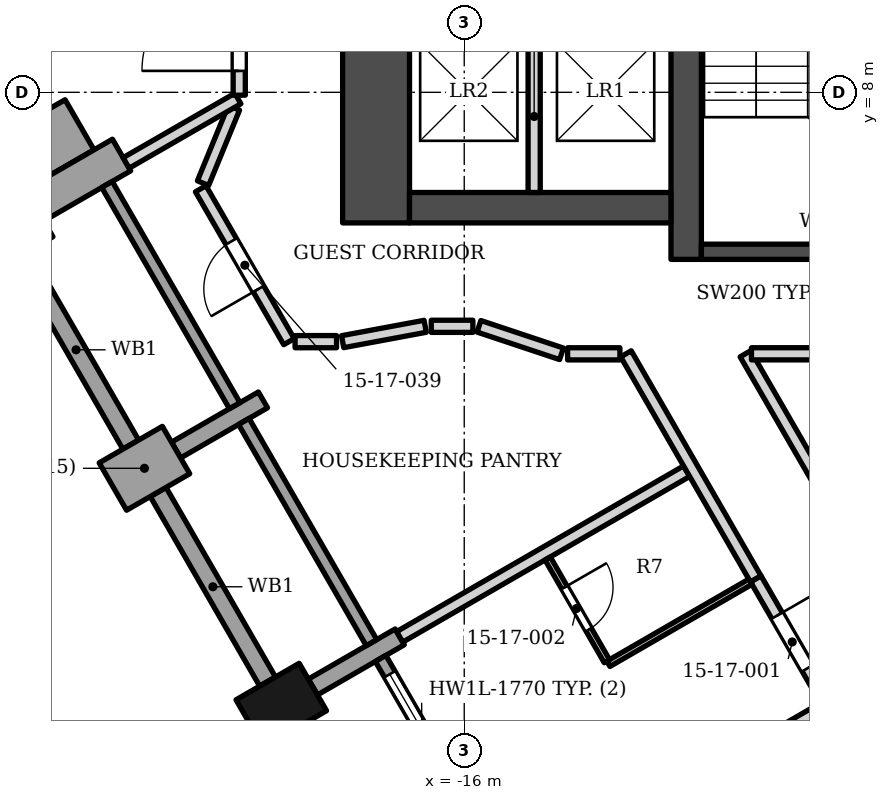
"""IFC4 building model, lengths in metres.
Left out: names, types, materials, properties, quantities, classifications, styles, units other than length and angle.
Written with IfcOpenShell. Run it as: python <this file> out.ifc"""

import sys

from ifc_helpers import new_model, si_unit, direction, frame, frame_2d, origin, origin_2d, place, context, subcontext, project, spatial, rectangle, extrude, element, fill, save


model = new_model("IFC4")
c1 = context("Model", 3, precision=1e-05, world=origin(), true_north=direction((0.0, 1.0)))
c2 = subcontext(c1, "Body", "Model", "MODEL_VIEW")
j1 = project(units=[si_unit("LENGTHUNIT", "METRE"), si_unit("PLANEANGLEUNIT", "RADIAN")], contexts=[c1])
p1 = place(None, origin())
s1 = spatial("IfcSite", under=j1, at=p1, CompositionType="ELEMENT")
p2 = place(p1, origin())
s2 = spatial("IfcBuilding", under=s1, at=p2, CompositionType="ELEMENT")
p3 = place(p2, frame((0.0, 0.0, 76.6)))
s3 = spatial("IfcBuildingStorey", under=s2, at=p3, CompositionType="ELEMENT", Elevation=76.6)
p4 = place(p3, frame((-12.35, 5.253, 0.0), z_axis=(0.0, 0.0, 1.0), x_axis=(0.0, 1.0, 0.0)))
e1 = element("IfcWall", 1, at=p4, inside=s3, PredefinedType="SHEAR", context=c2, shape_type="SweptSolid", body=[
    extrude(rectangle(XDim=13.3, YDim=0.5, at=frame_2d((6.65, 0.0))), origin(), (0.0, 0.0, 1.0), 3.4),
])
p5 = place(p3, frame((-12.1, 5.378, 0.0), z_axis=(0.0, 0.0, 1.0), x_axis=(1.0, 0.0, 0.0)))
e2 = element("IfcWall", 2, at=p5, inside=s3, PredefinedType="SHEAR", context=c2, shape_type="SweptSolid", body=[
    extrude(rectangle(XDim=3.75, YDim=0.25, at=frame_2d((1.875, 0.0))), origin(), (0.0, 0.0, 1.0), 3.4),
])
p6 = place(p3, frame((-12.6, 6.103, 0.0), z_axis=(0.0, 0.0, 1.0), x_axis=(-1.0, 0.0, 0.0)))
e3 = element("IfcWall", 3, at=p6, inside=s3, PredefinedType="SHEAR", context=c2, shape_type="SweptSolid", body=[
    extrude(rectangle(XDim=4.3, YDim=0.5, at=frame_2d((2.15, 0.0))), origin(), (0.0, 0.0, 1.0), 3.4),
])
p7 = place(p3, frame((-17.45, 5.853, 0.0), z_axis=(0.0, 0.0, 1.0), x_axis=(0.0, 1.0, 0.0)))
e4 = element("IfcWall", 4, at=p7, inside=s3, PredefinedType="SHEAR", context=c2, shape_type="SweptSolid", body=[
    extrude(rectangle(XDim=13.2, YDim=1.1, at=frame_2d((6.6, 0.0))), origin(), (0.0, 0.0, 1.0), 3.4),
])
p8 = place(p7, frame((4.1, 0.0, 0.0)))
e5 = element("IfcOpeningElement", 5, at=p8, cuts=e4, PredefinedType="OPENING", context=c2, shape_type="SweptSolid", body=[
    extrude(rectangle(XDim=1.6, YDim=2.1, at=frame_2d((0.8, 1.05))), frame((0.0, 0.56, 0.0), z_axis=(0.0, -1.0, 0.0), x_axis=(1.0, 0.0, 0.0)), (0.0, 0.0, 1.0), 1.12),
])
p9 = place(p7, frame((9.75, 0.0, 0.0)))
e6 = element("IfcOpeningElement", 6, at=p9, cuts=e4, PredefinedType="OPENING", context=c2, shape_type="SweptSolid", body=[
    extrude(rectangle(XDim=0.9, YDim=2.1, at=frame_2d((0.45, 1.05))), frame((0.0, 0.56, 0.0), z_axis=(0.0, -1.0, 0.0), x_axis=(1.0, 0.0, 0.0)), (0.0, 0.0, 1.0), 1.12),
])
for number, where, z_axis, x_axis in (
    (7, (-23.509, 5.714, 0.0), (0.0, 0.0, 1.0), (0.5, -0.866, 0.0)),
    (8, (-19.009, -2.08, 0.0), (0.0, 0.0, 1.0), (0.5, -0.866, 0.0)),
):
    element("IfcColumn", number, at=place(p3, frame(where, z_axis=z_axis, x_axis=x_axis)), inside=s3, PredefinedType="COLUMN", context=c2, shape_type="SweptSolid", body=[
        extrude(rectangle(XDim=0.9, YDim=1.2, at=origin_2d()), origin(), (0.0, 0.0, 1.0), 3.4),
    ])
p10 = place(p3, frame((-21.635, 6.969, 0.0), z_axis=(0.0, 0.0, 1.0), x_axis=(-0.866040211805, -0.499974350878, 0.0)))
e9 = element("IfcWall", 9, at=p10, inside=s3, PredefinedType="SOLIDWALL", context=c2, shape_type="SweptSolid", body=[
    extrude(rectangle(XDim=1.65, YDim=0.6, at=frame_2d((0.825, 0.0))), origin(), (0.0, 0.0, 1.0), 2.65),
])
p11 = place(p3, frame((-21.779, 1.517, 0.0), z_axis=(0.0, 0.0, 1.0), x_axis=(0.866094119867, 0.499880961361, 0.0)))
e10 = element("IfcWall", 10, at=p11, inside=s3, PredefinedType="SOLIDWALL", context=c2, shape_type="SweptSolid", body=[
    extrude(rectangle(XDim=1.2, YDim=0.9, at=frame_2d((0.6, 0.0))), origin(), (0.0, 0.0, 1.0), 2.63),
])
p12 = place(p3, frame((-20.74, 2.117, 0.0), z_axis=(0.0, 0.0, 1.0), x_axis=(0.865976140824, 0.500085316245, 0.0)))
e11 = element("IfcWall", 11, at=p12, inside=s3, PredefinedType="SOLIDWALL", context=c2, shape_type="SweptSolid", body=[
    extrude(rectangle(XDim=1.65, YDim=0.3, at=frame_2d((0.825, 0.0))), origin(), (0.0, 0.0, 1.0), 2.65),
])
p13 = place(p3, frame((-18.49, -1.78, 0.0), z_axis=(0.0, 0.0, 1.0), x_axis=(0.866040211805, 0.499974350878, 0.0)))
e12 = element("IfcWall", 12, at=p13, inside=s3, PredefinedType="SOLIDWALL", context=c2, shape_type="SweptSolid", body=[
    extrude(rectangle(XDim=1.65, YDim=0.3, at=frame_2d((0.825, 0.0))), origin(), (0.0, 0.0, 1.0), 2.65),
])
p14 = place(p3, frame((-23.284, 5.324, 0.0), z_axis=(0.0, 0.0, 1.0), x_axis=(0.500012057535, -0.866018442252, 0.0)))
e13 = element("IfcWall", 13, at=p14, inside=s3, PredefinedType="SOLIDWALL", context=c2, shape_type="SweptSolid", body=[
    extrude(rectangle(XDim=3.6, YDim=0.3, at=frame_2d((1.8, 0.0))), origin(), (0.0, 0.0, 1.0), 2.63),
])
p15 = place(p3, frame((-21.875, 6.484, 0.0), z_axis=(0.0, 0.0, 1.0), x_axis=(0.49998411664, -0.866034573852, 0.0)))
e14 = element("IfcWall", 14, at=p15, inside=s3, PredefinedType="ELEMENTEDWALL", context=c2, shape_type="SweptSolid", body=[
    extrude(rectangle(XDim=4.2, YDim=0.2, at=frame_2d((2.1, 0.0))), origin(), (0.0, 0.0, 1.0), 2.45),
])
p16 = place(p3, frame((-21.034, 1.427, 0.0), z_axis=(0.0, 0.0, 1.0), x_axis=(0.500012057535, -0.866018442252, 0.0)))
e15 = element("IfcWall", 15, at=p16, inside=s3, PredefinedType="SOLIDWALL", context=c2, shape_type="SweptSolid", body=[
    extrude(rectangle(XDim=3.6, YDim=0.3, at=frame_2d((1.8, 0.0))), origin(), (0.0, 0.0, 1.0), 2.63),
])
p17 = place(p3, frame((-19.625, 2.587, 0.0), z_axis=(0.0, 0.0, 1.0), x_axis=(0.499958946799, -0.866049104564, 0.0)))
e16 = element("IfcWall", 16, at=p17, inside=s3, PredefinedType="ELEMENTEDWALL", context=c2, shape_type="SweptSolid", body=[
    extrude(rectangle(XDim=4.2, YDim=0.2, at=frame_2d((2.1, 0.0))), origin(), (0.0, 0.0, 1.0), 2.65),
])
p18 = place(p3, frame((-17.375, -1.31, 0.0), z_axis=(0.0, 0.0, 1.0), x_axis=(0.49998411664, -0.866034573852, 0.0)))
e17 = element("IfcWall", 17, at=p18, inside=s3, PredefinedType="ELEMENTEDWALL", context=c2, shape_type="SweptSolid", body=[
    extrude(rectangle(XDim=4.2, YDim=0.2, at=frame_2d((2.1, 0.0))), origin(), (0.0, 0.0, 1.0), 2.473),
])
p19 = place(p18, frame((0.3, 0.0, 0.6)))
e18 = element("IfcOpeningElement", 18, at=p19, cuts=e17, PredefinedType="OPENING", context=c2, shape_type="SweptSolid", body=[
    extrude(rectangle(XDim=2.1, YDim=1.77, at=frame_2d((1.05, 0.885))), frame((0.0, 0.11, 0.0), z_axis=(0.0, -1.0, 0.0), x_axis=(1.0, 0.0, 0.0)), (0.0, 0.0, 1.0), 0.22),
])
p20 = place(p18, frame((2.7, 0.0, 0.0)))
e19 = element("IfcOpeningElement", 19, at=p20, cuts=e17, PredefinedType="OPENING", context=c2, shape_type="SweptSolid", body=[
    extrude(rectangle(XDim=1.2, YDim=2.37, at=frame_2d((0.6, 1.185))), frame((0.0, 0.11, 0.0), z_axis=(0.0, -1.0, 0.0), x_axis=(1.0, 0.0, 0.0)), (0.0, 0.0, 1.0), 0.22),
])
p21 = place(p3, frame((-22.327, 7.466, 0.0), z_axis=(0.0, 0.0, 1.0), x_axis=(-0.866022959057, -0.500004234368, 0.0)))
e20 = element("IfcWall", 20, at=p21, inside=s3, PredefinedType="SOLIDWALL", context=c2, shape_type="SweptSolid", body=[
    extrude(rectangle(XDim=2.5, YDim=0.952, at=frame_2d((1.25, 0.0))), origin(), (0.0, 0.0, 1.0), 2.63),
])
p22 = place(p3, frame((-14.85, 6.353, 0.0), z_axis=(0.0, 0.0, 1.0), x_axis=(0.0, 1.0, 0.0)))
e21 = element("IfcWall", 21, at=p22, inside=s3, PredefinedType="SOLIDWALL", context=c2, shape_type="SweptSolid", body=[
    extrude(rectangle(XDim=2.5, YDim=0.2, at=frame_2d((1.25, 0.0))), origin(), (0.0, 0.0, 1.0), 3.23),
])
p23 = place(p3, frame((-11.206, 0.0, 0.0), z_axis=(0.0, 0.0, 1.0), x_axis=(0.500002959525, -0.866023695095, 0.0)))
e22 = element("IfcWall", 22, at=p23, inside=s3, PredefinedType="PARTITIONING", context=c2, shape_type="SweptSolid", body=[
    extrude(rectangle(XDim=22.351, YDim=0.2, at=frame_2d((11.175, 0.0))), origin(), (0.0, 0.0, 1.0), 2.242),
])
p24 = place(p23, frame((0.7, 0.0, 0.0)))
e23 = element("IfcOpeningElement", 23, at=p24, cuts=e22, PredefinedType="OPENING", context=c2, shape_type="SweptSolid", body=[
    extrude(rectangle(XDim=1.0, YDim=2.1, at=frame_2d((0.5, 1.05))), frame((0.0, 0.11, 0.0), z_axis=(0.0, -1.0, 0.0), x_axis=(1.0, 0.0, 0.0)), (0.0, 0.0, 1.0), 0.22),
])
p25 = place(p23, frame((3.1, 0.0, 0.0)))
e24 = element("IfcOpeningElement", 24, at=p25, cuts=e22, PredefinedType="OPENING", context=c2, shape_type="SweptSolid", body=[
    extrude(rectangle(XDim=1.0, YDim=2.1, at=frame_2d((0.5, 1.05))), frame((0.0, 0.11, 0.0), z_axis=(0.0, -1.0, 0.0), x_axis=(1.0, 0.0, 0.0)), (0.0, 0.0, 1.0), 0.22),
])
p26 = place(p23, frame((9.7, 0.0, 0.0)))
e25 = element("IfcOpeningElement", 25, at=p26, cuts=e22, PredefinedType="OPENING", context=c2, shape_type="SweptSolid", body=[
    extrude(rectangle(XDim=1.0, YDim=2.1, at=frame_2d((0.5, 1.05))), frame((0.0, 0.11, 0.0), z_axis=(0.0, -1.0, 0.0), x_axis=(1.0, 0.0, 0.0)), (0.0, 0.0, 1.0), 0.22),
])
p27 = place(p23, frame((12.1, 0.0, 0.0)))
e26 = element("IfcOpeningElement", 26, at=p27, cuts=e22, PredefinedType="OPENING", context=c2, shape_type="SweptSolid", body=[
    extrude(rectangle(XDim=1.0, YDim=2.1, at=frame_2d((0.5, 1.05))), frame((0.0, 0.11, 0.0), z_axis=(0.0, -1.0, 0.0), x_axis=(1.0, 0.0, 0.0)), (0.0, 0.0, 1.0), 0.22),
])
p28 = place(p23, frame((16.4, 0.0, 0.0)))
e27 = element("IfcOpeningElement", 27, at=p28, cuts=e22, PredefinedType="OPENING", context=c2, shape_type="SweptSolid", body=[
    extrude(rectangle(XDim=1.1, YDim=2.1, at=frame_2d((0.55, 1.05))), frame((0.0, 0.11, 0.0), z_axis=(0.0, -1.0, 0.0), x_axis=(1.0, 0.0, 0.0)), (0.0, 0.0, 1.0), 0.22),
])
p29 = place(p23, frame((20.925, 0.0, 0.0)))
e28 = element("IfcOpeningElement", 28, at=p29, cuts=e22, PredefinedType="OPENING", context=c2, shape_type="SweptSolid", body=[
    extrude(rectangle(XDim=1.1, YDim=2.1, at=frame_2d((0.55, 1.05))), frame((0.0, 0.11, 0.0), z_axis=(0.0, -1.0, 0.0), x_axis=(1.0, 0.0, 0.0)), (0.0, 0.0, 1.0), 0.22),
])
p30 = place(p3, frame((-14.811, -4.852, 0.0), z_axis=(0.0, 0.0, 1.0), x_axis=(0.866193043817, 0.499709526468, 0.0)))
e29 = element("IfcWall", 29, at=p30, inside=s3, PredefinedType="PARTITIONING", context=c2, shape_type="SweptSolid", body=[
    extrude(rectangle(XDim=5.45, YDim=0.2, at=frame_2d((2.725, 0.0))), origin(), (0.0, 0.0, 1.0), 2.242),
])
p31 = place(p30, frame((1.3, 0.0, 0.0)))
e30 = element("IfcOpeningElement", 30, at=p31, cuts=e29, PredefinedType="OPENING", context=c2, shape_type="SweptSolid", body=[
    extrude(rectangle(XDim=0.9, YDim=2.1, at=frame_2d((0.45, 1.05))), frame((0.0, 0.11, 0.0), z_axis=(0.0, -1.0, 0.0), x_axis=(1.0, 0.0, 0.0)), (0.0, 0.0, 1.0), 0.22),
])
p32 = place(p3, frame((-13.629, -1.399, 0.0), z_axis=(0.0, 0.0, 1.0), x_axis=(0.86571095196, 0.500544251447, 0.0)))
e31 = element("IfcWall", 31, at=p32, inside=s3, PredefinedType="PARTITIONING", context=c2, shape_type="SweptSolid", body=[
    extrude(rectangle(XDim=2.7, YDim=0.1, at=frame_2d((1.35, 0.0))), origin(), (0.0, 0.0, 1.0), 2.242),
])
p33 = place(p3, frame((-17.061, -0.955, 0.0), z_axis=(0.0, 0.0, 1.0), x_axis=(0.866031107881, 0.499990120084, 0.0)))
e32 = element("IfcWall", 32, at=p33, inside=s3, PredefinedType="PARTITIONING", context=c2, shape_type="SweptSolid", body=[
    extrude(rectangle(XDim=5.448, YDim=0.2, at=frame_2d((2.724, 0.0))), origin(), (0.0, 0.0, 1.0), 2.242),
])
p34 = place(p3, frame((-13.34, 3.699, 0.0), z_axis=(0.0, 0.0, 1.0), x_axis=(0.499410635897, -0.866365406023, 0.0)))
e33 = element("IfcWall", 33, at=p34, inside=s3, PredefinedType="PARTITIONING", context=c2, shape_type="SweptSolid", body=[
    extrude(rectangle(XDim=4.271, YDim=0.2, at=frame_2d((2.135, 0.0))), origin(), (0.0, 0.0, 1.0), 2.242),
])
p35 = place(p3, frame((-14.628, 0.334, 0.0), z_axis=(0.0, 0.0, 1.0), x_axis=(0.499317740681, -0.866418948224, 0.0)))
e34 = element("IfcWall", 34, at=p35, inside=s3, PredefinedType="PARTITIONING", context=c2, shape_type="SweptSolid", body=[
    extrude(rectangle(XDim=1.95, YDim=0.1, at=frame_2d((0.975, 0.0))), origin(), (0.0, 0.0, 1.0), 2.242),
])
p36 = place(p35, frame((0.55, 0.0, 0.0)))
e35 = element("IfcOpeningElement", 35, at=p36, cuts=e34, PredefinedType="OPENING", context=c2, shape_type="SweptSolid", body=[
    extrude(rectangle(XDim=0.8, YDim=2.1, at=frame_2d((0.4, 1.05))), frame((0.0, 0.06, 0.0), z_axis=(0.0, -1.0, 0.0), x_axis=(1.0, 0.0, 0.0)), (0.0, 0.0, 1.0), 0.12),
])
p37 = place(p3, frame((-15.758, 4.152, 0.0), z_axis=(0.0, 0.0, 1.0), x_axis=(0.948666237396, -0.316278943379, 0.0)))
e36 = element("IfcWall", 36, at=p37, inside=s3, PredefinedType="PARTITIONING", context=c2, shape_type="SweptSolid", body=[
    extrude(rectangle(XDim=1.431, YDim=0.2, at=frame_2d((0.716, 0.0))), origin(), (0.0, 0.0, 1.0), 2.473),
])
p38 = place(p3, frame((-14.3, 3.699, 0.0), z_axis=(0.0, 0.0, 1.0), x_axis=(1.0, 0.0, 0.0)))
e37 = element("IfcWall", 37, at=p38, inside=s3, PredefinedType="PARTITIONING", context=c2, shape_type="SweptSolid", body=[
    extrude(rectangle(XDim=0.86, YDim=0.2, at=frame_2d((0.43, 0.0))), origin(), (0.0, 0.0, 1.0), 2.242),
])
p39 = place(p3, frame((-11.376, 3.7, 0.0), z_axis=(0.0, 0.0, 1.0), x_axis=(0.500182929981, -0.865919763347, 0.0)))
e38 = element("IfcWall", 38, at=p39, inside=s3, PredefinedType="PARTITIONING", context=c2, shape_type="SweptSolid", body=[
    extrude(rectangle(XDim=8.765, YDim=0.2, at=frame_2d((4.383, 0.0))), origin(), (0.0, 0.0, 1.0), 2.242),
])
p40 = place(p39, frame((4.683, 0.0, 0.0)))
e39 = element("IfcOpeningElement", 39, at=p40, cuts=e38, PredefinedType="OPENING", context=c2, shape_type="SweptSolid", body=[
    extrude(rectangle(XDim=1.6, YDim=2.1, at=frame_2d((0.8, 1.05))), frame((0.0, 0.11, 0.0), z_axis=(0.0, -1.0, 0.0), x_axis=(1.0, 0.0, 0.0)), (0.0, 0.0, 1.0), 0.22),
])
p41 = place(p3, frame((-11.276, 3.7, 0.0), z_axis=(0.0, 0.0, 1.0), x_axis=(1.0, 0.0, 0.0)))
e40 = element("IfcWall", 40, at=p41, inside=s3, PredefinedType="PARTITIONING", context=c2, shape_type="SweptSolid", body=[
    extrude(rectangle(XDim=5.276, YDim=0.2, at=frame_2d((2.638, 0.0))), origin(), (0.0, 0.0, 1.0), 2.242),
])
p42 = place(p3, frame((-20.334, 6.414, 0.0), z_axis=(0.0, 0.0, 1.0), x_axis=(0.499991774685, -0.86603015262, 0.0)))
e41 = element("IfcWall", 41, at=p42, inside=s3, PredefinedType="PARTITIONING", context=c2, shape_type="SweptSolid", body=[
    extrude(rectangle(XDim=2.903, YDim=0.2, at=frame_2d((1.452, 0.0))), origin(), (0.0, 0.0, 1.0), 2.45),
])
p43 = place(p42, frame((1.002, 0.0, 0.0)))
e42 = element("IfcOpeningElement", 42, at=p43, cuts=e41, PredefinedType="OPENING", context=c2, shape_type="SweptSolid", body=[
    extrude(rectangle(XDim=0.9, YDim=2.1, at=frame_2d((0.45, 1.05))), frame((0.0, 0.11, 0.0), z_axis=(0.0, -1.0, 0.0), x_axis=(1.0, 0.0, 0.0)), (0.0, 0.0, 1.0), 0.22),
])
p44 = place(p3, frame((-18.782, 3.899, 0.0), z_axis=(0.0, 0.0, 1.0), x_axis=(1.0, 0.0, 0.0)))
e43 = element("IfcWall", 43, at=p44, inside=s3, PredefinedType="PARTITIONING", context=c2, shape_type="SweptSolid", body=[
    extrude(rectangle(XDim=0.682, YDim=0.2, at=frame_2d((0.341, 0.0))), origin(), (0.0, 0.0, 1.0), 3.23),
])
p45 = place(p3, frame((-18.0, 3.899, 0.0), z_axis=(0.0, 0.0, 1.0), x_axis=(0.983117478865, 0.182975470352, 0.0)))
e44 = element("IfcWall", 44, at=p45, inside=s3, PredefinedType="PARTITIONING", context=c2, shape_type="SweptSolid", body=[
    extrude(rectangle(XDim=1.381, YDim=0.2, at=frame_2d((0.69, 0.0))), origin(), (0.0, 0.0, 1.0), 2.702),
])
p46 = place(p3, frame((-16.542, 4.152, 0.0), z_axis=(0.0, 0.0, 1.0), x_axis=(1.0, 0.0, 0.0)))
e45 = element("IfcWall", 45, at=p46, inside=s3, PredefinedType="PARTITIONING", context=c2, shape_type="SweptSolid", body=[
    extrude(rectangle(XDim=0.684, YDim=0.2, at=frame_2d((0.342, 0.0))), origin(), (0.0, 0.0, 1.0), 2.473),
])
p47 = place(p3, frame((-20.296, 6.507, 0.0), z_axis=(0.0, 0.0, 1.0), x_axis=(0.379924425103, 0.925017530218, 0.0)))
e46 = element("IfcWall", 46, at=p47, inside=s3, PredefinedType="PARTITIONING", context=c2, shape_type="SweptSolid", body=[
    extrude(rectangle(XDim=1.339, YDim=0.2, at=frame_2d((0.669, 0.0))), origin(), (0.0, 0.0, 1.0), 2.473),
])
p48 = place(p3, frame((-21.561, 6.839, 0.0), z_axis=(0.0, 0.0, 1.0), x_axis=(0.866480611472, 0.499210726992, 0.0)))
e47 = element("IfcWall", 47, at=p48, inside=s3, PredefinedType="PARTITIONING", context=c2, shape_type="SweptSolid", body=[
    extrude(rectangle(XDim=2.121, YDim=0.2, at=frame_2d((1.06, 0.0))), origin(), (0.0, 0.0, 1.0), 2.473),
])
p49 = place(p3, frame((-19.7, 7.953, 0.0), z_axis=(0.0, 0.0, 1.0), x_axis=(0.0, 1.0, 0.0)))
e48 = element("IfcWall", 48, at=p49, inside=s3, PredefinedType="PARTITIONING", context=c2, shape_type="SweptSolid", body=[
    extrude(rectangle(XDim=5.5, YDim=0.2, at=frame_2d((2.75, 0.0))), origin(), (0.0, 0.0, 1.0), 3.23),
])
p50 = place(p49, frame((0.4, 0.0, 0.0)))
e49 = element("IfcOpeningElement", 49, at=p50, cuts=e48, PredefinedType="OPENING", context=c2, shape_type="SweptSolid", body=[
    extrude(rectangle(XDim=1.6, YDim=2.1, at=frame_2d((0.8, 1.05))), frame((0.0, 0.11, 0.0), z_axis=(0.0, -1.0, 0.0), x_axis=(1.0, 0.0, 0.0)), (0.0, 0.0, 1.0), 0.22),
])
p51 = place(p49, frame((3.45, 0.0, 0.0)))
e50 = element("IfcOpeningElement", 50, at=p51, cuts=e48, PredefinedType="OPENING", context=c2, shape_type="SweptSolid", body=[
    extrude(rectangle(XDim=1.6, YDim=2.1, at=frame_2d((0.8, 1.05))), frame((0.0, 0.11, 0.0), z_axis=(0.0, -1.0, 0.0), x_axis=(1.0, 0.0, 0.0)), (0.0, 0.0, 1.0), 0.22),
])
p52 = place(p19, origin())
e51 = element("IfcWindow", 51, at=p52, inside=s3, PartitioningType="SINGLE_PANEL", PredefinedType="WINDOW", context=c2, shape_type="SweptSolid", body=[
    extrude(rectangle(XDim=2.1, YDim=1.77, at=frame_2d((1.05, 0.885))), frame((0.0, 0.03, 0.0), z_axis=(0.0, -1.0, 0.0), x_axis=(1.0, 0.0, 0.0)), (0.0, 0.0, 1.0), 0.06),
])
fill(e18, e51)
p53 = place(p24, origin())
e52 = element("IfcDoor", 52, at=p53, inside=s3, OperationType="SINGLE_SWING_LEFT", PredefinedType="DOOR", context=c2, shape_type="SweptSolid", body=[
    extrude(rectangle(XDim=1.0, YDim=2.1, at=frame_2d((0.5, 1.05))), frame((0.0, 0.025, 0.0), z_axis=(0.0, -1.0, 0.0), x_axis=(1.0, 0.0, 0.0)), (0.0, 0.0, 1.0), 0.05),
])
fill(e23, e52)
p54 = place(p36, origin())
e53 = element("IfcDoor", 53, at=p54, inside=s3, OperationType="SINGLE_SWING_LEFT", PredefinedType="DOOR", context=c2, shape_type="SweptSolid", body=[
    extrude(rectangle(XDim=0.8, YDim=2.1, at=frame_2d((0.4, 1.05))), frame((0.0, 0.025, 0.0), z_axis=(0.0, -1.0, 0.0), x_axis=(1.0, 0.0, 0.0)), (0.0, 0.0, 1.0), 0.05),
])
fill(e35, e53)
p55 = place(p50, origin())
e54 = element("IfcDoor", 54, at=p55, inside=s3, OperationType="DOUBLE_DOOR_SINGLE_SWING", PredefinedType="DOOR", context=c2, shape_type="SweptSolid", body=[
    extrude(rectangle(XDim=1.6, YDim=2.1, at=frame_2d((0.8, 1.05))), frame((0.0, 0.025, 0.0), z_axis=(0.0, -1.0, 0.0), x_axis=(1.0, 0.0, 0.0)), (0.0, 0.0, 1.0), 0.05),
])
fill(e49, e54)
p56 = place(p43, origin())
e55 = element("IfcDoor", 55, at=p56, inside=s3, OperationType="SINGLE_SWING_RIGHT", PredefinedType="DOOR", context=c2, shape_type="SweptSolid", body=[
    extrude(rectangle(XDim=0.9, YDim=2.1, at=frame_2d((0.45, 1.05))), frame((0.0, 0.025, 0.0), z_axis=(0.0, -1.0, 0.0), x_axis=(1.0, 0.0, 0.0)), (0.0, 0.0, 1.0), 0.05),
])
fill(e42, e55)
save(model, sys.argv[1])
